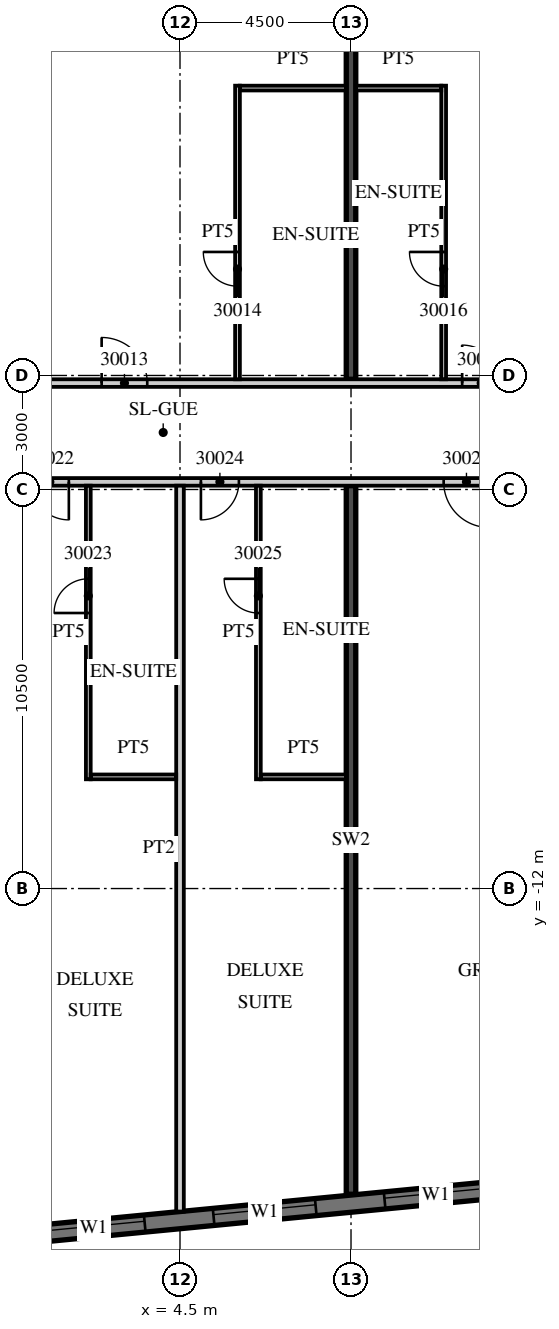
"""IFC4 building model, lengths in metres.
Left out: names, types, materials, properties, quantities, classifications, styles, units other than length and angle.
Written with IfcOpenShell. Run it as: python <this file> out.ifc"""

import sys

from ifc_helpers import new_model, si_unit, direction, frame, frame_2d, origin, place, context, subcontext, project, spatial, rectangle, extrude, element, fill, save


model = new_model("IFC4")
c1 = context("Model", 3, precision=1e-05, world=origin(), true_north=direction((0.0, 1.0)))
c2 = subcontext(c1, "Body", "Model", "MODEL_VIEW")
j1 = project(units=[si_unit("LENGTHUNIT", "METRE"), si_unit("PLANEANGLEUNIT", "RADIAN")], contexts=[c1])
p1 = place(None, origin())
s1 = spatial("IfcSite", under=j1, at=p1, CompositionType="ELEMENT")
p2 = place(p1, origin())
s2 = spatial("IfcBuilding", under=s1, at=p2, CompositionType="ELEMENT")
p3 = place(p2, frame((0.0, 0.0, 133.9)))
s3 = spatial("IfcBuildingStorey", under=s2, at=p3, CompositionType="ELEMENT", Elevation=133.9)
p4 = place(p3, frame((9.0, -20.044, 0.0), z_axis=(0.0, 0.0, 1.0), x_axis=(0.0, 1.0, 0.0)))
e1 = element("IfcWall", 1, at=p4, inside=s3, PredefinedType="SHEAR", context=c2, shape_type="SweptSolid", body=[
    extrude(rectangle(XDim=18.644, YDim=0.25, at=frame_2d((9.322, 0.0))), origin(), (0.0, 0.0, 1.0), 3.3),
])
p5 = place(p3, frame((9.0, 1.4, 0.0), z_axis=(0.0, 0.0, 1.0), x_axis=(0.0, 1.0, 0.0)))
e2 = element("IfcWall", 2, at=p5, inside=s3, PredefinedType="SHEAR", context=c2, shape_type="SweptSolid", body=[
    extrude(rectangle(XDim=20.807, YDim=0.25, at=frame_2d((10.403, 0.0))), origin(), (0.0, 0.0, 1.0), 3.3),
])
p6 = place(p3, frame((-13.521, -22.46, 0.0), z_axis=(0.0, 0.0, 1.0), x_axis=(0.995396096335, 0.095846812164, 0.0)))
e3 = element("IfcWall", 3, at=p6, inside=s3, PredefinedType="SOLIDWALL", context=c2, shape_type="SweptSolid", body=[
    extrude(rectangle(XDim=59.151, YDim=0.45, at=frame_2d((29.575, 0.0))), origin(), (0.0, 0.0, 1.0), 3.02),
])
p7 = place(p6, frame((0.91, 0.0, 0.45)))
e4 = element("IfcOpeningElement", 4, at=p7, cuts=e3, PredefinedType="OPENING", context=c2, shape_type="SweptSolid", body=[
    extrude(rectangle(XDim=2.7, YDim=2.25, at=frame_2d((1.35, 1.125))), frame((0.0, 0.235, 0.0), z_axis=(0.0, -1.0, 0.0), x_axis=(1.0, 0.0, 0.0)), (0.0, 0.0, 1.0), 0.47),
])
p8 = place(p6, frame((5.431, 0.0, 0.45)))
e5 = element("IfcOpeningElement", 5, at=p8, cuts=e3, PredefinedType="OPENING", context=c2, shape_type="SweptSolid", body=[
    extrude(rectangle(XDim=2.7, YDim=2.25, at=frame_2d((1.35, 1.125))), frame((0.0, 0.235, 0.0), z_axis=(0.0, -1.0, 0.0), x_axis=(1.0, 0.0, 0.0)), (0.0, 0.0, 1.0), 0.47),
])
p9 = place(p6, frame((9.952, 0.0, 0.45)))
e6 = element("IfcOpeningElement", 6, at=p9, cuts=e3, PredefinedType="OPENING", context=c2, shape_type="SweptSolid", body=[
    extrude(rectangle(XDim=2.7, YDim=2.25, at=frame_2d((1.35, 1.125))), frame((0.0, 0.235, 0.0), z_axis=(0.0, -1.0, 0.0), x_axis=(1.0, 0.0, 0.0)), (0.0, 0.0, 1.0), 0.47),
])
p10 = place(p6, frame((14.473, 0.0, 0.45)))
e7 = element("IfcOpeningElement", 7, at=p10, cuts=e3, PredefinedType="OPENING", context=c2, shape_type="SweptSolid", body=[
    extrude(rectangle(XDim=2.7, YDim=2.25, at=frame_2d((1.35, 1.125))), frame((0.0, 0.235, 0.0), z_axis=(0.0, -1.0, 0.0), x_axis=(1.0, 0.0, 0.0)), (0.0, 0.0, 1.0), 0.47),
])
p11 = place(p6, frame((18.994, 0.0, 0.45)))
e8 = element("IfcOpeningElement", 8, at=p11, cuts=e3, PredefinedType="OPENING", context=c2, shape_type="SweptSolid", body=[
    extrude(rectangle(XDim=2.7, YDim=2.25, at=frame_2d((1.35, 1.125))), frame((0.0, 0.235, 0.0), z_axis=(0.0, -1.0, 0.0), x_axis=(1.0, 0.0, 0.0)), (0.0, 0.0, 1.0), 0.47),
])
p12 = place(p6, frame((23.514, 0.0, 0.45)))
e9 = element("IfcOpeningElement", 9, at=p12, cuts=e3, PredefinedType="OPENING", context=c2, shape_type="SweptSolid", body=[
    extrude(rectangle(XDim=2.7, YDim=2.25, at=frame_2d((1.35, 1.125))), frame((0.0, 0.235, 0.0), z_axis=(0.0, -1.0, 0.0), x_axis=(1.0, 0.0, 0.0)), (0.0, 0.0, 1.0), 0.47),
])
p13 = place(p6, frame((28.035, 0.0, 0.45)))
e10 = element("IfcOpeningElement", 10, at=p13, cuts=e3, PredefinedType="OPENING", context=c2, shape_type="SweptSolid", body=[
    extrude(rectangle(XDim=2.7, YDim=2.25, at=frame_2d((1.35, 1.125))), frame((0.0, 0.235, 0.0), z_axis=(0.0, -1.0, 0.0), x_axis=(1.0, 0.0, 0.0)), (0.0, 0.0, 1.0), 0.47),
])
p14 = place(p6, frame((32.556, 0.0, 0.45)))
e11 = element("IfcOpeningElement", 11, at=p14, cuts=e3, PredefinedType="OPENING", context=c2, shape_type="SweptSolid", body=[
    extrude(rectangle(XDim=2.7, YDim=2.25, at=frame_2d((1.35, 1.125))), frame((0.0, 0.235, 0.0), z_axis=(0.0, -1.0, 0.0), x_axis=(1.0, 0.0, 0.0)), (0.0, 0.0, 1.0), 0.47),
])
p15 = place(p6, frame((37.077, 0.0, 0.45)))
e12 = element("IfcOpeningElement", 12, at=p15, cuts=e3, PredefinedType="OPENING", context=c2, shape_type="SweptSolid", body=[
    extrude(rectangle(XDim=2.7, YDim=2.25, at=frame_2d((1.35, 1.125))), frame((0.0, 0.235, 0.0), z_axis=(0.0, -1.0, 0.0), x_axis=(1.0, 0.0, 0.0)), (0.0, 0.0, 1.0), 0.47),
])
p16 = place(p6, frame((41.598, 0.0, 0.45)))
e13 = element("IfcOpeningElement", 13, at=p16, cuts=e3, PredefinedType="OPENING", context=c2, shape_type="SweptSolid", body=[
    extrude(rectangle(XDim=2.7, YDim=2.25, at=frame_2d((1.35, 1.125))), frame((0.0, 0.235, 0.0), z_axis=(0.0, -1.0, 0.0), x_axis=(1.0, 0.0, 0.0)), (0.0, 0.0, 1.0), 0.47),
])
p17 = place(p6, frame((46.118, 0.0, 0.45)))
e14 = element("IfcOpeningElement", 14, at=p17, cuts=e3, PredefinedType="OPENING", context=c2, shape_type="SweptSolid", body=[
    extrude(rectangle(XDim=2.7, YDim=2.25, at=frame_2d((1.35, 1.125))), frame((0.0, 0.235, 0.0), z_axis=(0.0, -1.0, 0.0), x_axis=(1.0, 0.0, 0.0)), (0.0, 0.0, 1.0), 0.47),
])
p18 = place(p6, frame((50.639, 0.0, 0.45)))
e15 = element("IfcOpeningElement", 15, at=p18, cuts=e3, PredefinedType="OPENING", context=c2, shape_type="SweptSolid", body=[
    extrude(rectangle(XDim=2.7, YDim=2.25, at=frame_2d((1.35, 1.125))), frame((0.0, 0.235, 0.0), z_axis=(0.0, -1.0, 0.0), x_axis=(1.0, 0.0, 0.0)), (0.0, 0.0, 1.0), 0.47),
])
p19 = place(p6, frame((55.15, 0.0, 0.45)))
e16 = element("IfcOpeningElement", 16, at=p19, cuts=e3, PredefinedType="OPENING", context=c2, shape_type="SweptSolid", body=[
    extrude(rectangle(XDim=2.7, YDim=2.25, at=frame_2d((1.35, 1.125))), frame((0.0, 0.235, 0.0), z_axis=(0.0, -1.0, 0.0), x_axis=(1.0, 0.0, 0.0)), (0.0, 0.0, 1.0), 0.47),
])
p20 = place(p3, frame((-39.316, 1.3, 0.0), z_axis=(0.0, 0.0, 1.0), x_axis=(1.0, 0.0, 0.0)))
e17 = element("IfcWall", 17, at=p20, inside=s3, PredefinedType="PARTITIONING", context=c2, shape_type="SweptSolid", body=[
    extrude(rectangle(XDim=52.816, YDim=0.2, at=frame_2d((26.408, 0.0))), origin(), (0.0, 0.0, 1.0), 3.02),
])
p21 = place(p20, frame((0.15, 0.0, 0.0)))
e18 = element("IfcOpeningElement", 18, at=p21, cuts=e17, PredefinedType="OPENING", context=c2, shape_type="SweptSolid", body=[
    extrude(rectangle(XDim=0.9, YDim=2.1, at=frame_2d((0.45, 1.05))), frame((0.0, 0.11, 0.0), z_axis=(0.0, -1.0, 0.0), x_axis=(1.0, 0.0, 0.0)), (0.0, 0.0, 1.0), 0.22),
])
p22 = place(p20, frame((8.679, 0.0, 0.0)))
e19 = element("IfcOpeningElement", 19, at=p22, cuts=e17, PredefinedType="OPENING", context=c2, shape_type="SweptSolid", body=[
    extrude(rectangle(XDim=1.2, YDim=2.1, at=frame_2d((0.6, 1.05))), frame((0.0, 0.11, 0.0), z_axis=(0.0, -1.0, 0.0), x_axis=(1.0, 0.0, 0.0)), (0.0, 0.0, 1.0), 0.22),
])
p23 = place(p20, frame((14.754, 0.0, 0.0)))
e20 = element("IfcOpeningElement", 20, at=p23, cuts=e17, PredefinedType="OPENING", context=c2, shape_type="SweptSolid", body=[
    extrude(rectangle(XDim=1.2, YDim=2.1, at=frame_2d((0.6, 1.05))), frame((0.0, 0.11, 0.0), z_axis=(0.0, -1.0, 0.0), x_axis=(1.0, 0.0, 0.0)), (0.0, 0.0, 1.0), 0.22),
])
p24 = place(p20, frame((26.678, 0.0, 0.0)))
e21 = element("IfcOpeningElement", 21, at=p24, cuts=e17, PredefinedType="OPENING", context=c2, shape_type="SweptSolid", body=[
    extrude(rectangle(XDim=1.2, YDim=2.1, at=frame_2d((0.6, 1.05))), frame((0.0, 0.11, 0.0), z_axis=(0.0, -1.0, 0.0), x_axis=(1.0, 0.0, 0.0)), (0.0, 0.0, 1.0), 0.22),
])
p25 = place(p20, frame((33.266, 0.0, 0.0)))
e22 = element("IfcOpeningElement", 22, at=p25, cuts=e17, PredefinedType="OPENING", context=c2, shape_type="SweptSolid", body=[
    extrude(rectangle(XDim=1.0, YDim=2.1, at=frame_2d((0.5, 1.05))), frame((0.0, 0.11, 0.0), z_axis=(0.0, -1.0, 0.0), x_axis=(1.0, 0.0, 0.0)), (0.0, 0.0, 1.0), 0.22),
])
p26 = place(p20, frame((37.741, 0.0, 0.0)))
e23 = element("IfcOpeningElement", 23, at=p26, cuts=e17, PredefinedType="OPENING", context=c2, shape_type="SweptSolid", body=[
    extrude(rectangle(XDim=1.0, YDim=2.1, at=frame_2d((0.5, 1.05))), frame((0.0, 0.11, 0.0), z_axis=(0.0, -1.0, 0.0), x_axis=(1.0, 0.0, 0.0)), (0.0, 0.0, 1.0), 0.22),
])
p27 = place(p20, frame((41.754, 0.0, 0.0)))
e24 = element("IfcOpeningElement", 24, at=p27, cuts=e17, PredefinedType="OPENING", context=c2, shape_type="SweptSolid", body=[
    extrude(rectangle(XDim=1.2, YDim=2.1, at=frame_2d((0.6, 1.05))), frame((0.0, 0.11, 0.0), z_axis=(0.0, -1.0, 0.0), x_axis=(1.0, 0.0, 0.0)), (0.0, 0.0, 1.0), 0.22),
])
p28 = place(p20, frame((51.241, 0.0, 0.0)))
e25 = element("IfcOpeningElement", 25, at=p28, cuts=e17, PredefinedType="OPENING", context=c2, shape_type="SweptSolid", body=[
    extrude(rectangle(XDim=1.0, YDim=2.1, at=frame_2d((0.5, 1.05))), frame((0.0, 0.11, 0.0), z_axis=(0.0, -1.0, 0.0), x_axis=(1.0, 0.0, 0.0)), (0.0, 0.0, 1.0), 0.22),
])
p29 = place(p3, frame((6.013, 1.4, 0.0), z_axis=(0.0, 0.0, 1.0), x_axis=(0.0, 1.0, 0.0)))
e26 = element("IfcWall", 26, at=p29, inside=s3, PredefinedType="PARTITIONING", context=c2, shape_type="SweptSolid", body=[
    extrude(rectangle(XDim=7.725, YDim=0.125, at=frame_2d((3.863, 0.0))), origin(), (0.0, 0.0, 1.0), 3.02),
])
p30 = place(p29, frame((2.45, 0.0, 0.0)))
e27 = element("IfcOpeningElement", 27, at=p30, cuts=e26, PredefinedType="OPENING", context=c2, shape_type="SweptSolid", body=[
    extrude(rectangle(XDim=0.9, YDim=2.1, at=frame_2d((0.45, 1.05))), frame((0.0, 0.073, 0.0), z_axis=(0.0, -1.0, 0.0), x_axis=(1.0, 0.0, 0.0)), (0.0, 0.0, 1.0), 0.145),
])
p31 = place(p3, frame((6.075, 9.062, 0.0), z_axis=(0.0, 0.0, 1.0), x_axis=(1.0, 0.0, 0.0)))
e28 = element("IfcWall", 28, at=p31, inside=s3, PredefinedType="PARTITIONING", context=c2, shape_type="SweptSolid", body=[
    extrude(rectangle(XDim=2.8, YDim=0.125, at=frame_2d((1.4, 0.0))), origin(), (0.0, 0.0, 1.0), 3.02),
])
p32 = place(p3, frame((11.438, 1.4, 0.0), z_axis=(0.0, 0.0, 1.0), x_axis=(0.0, 1.0, 0.0)))
e29 = element("IfcWall", 29, at=p32, inside=s3, PredefinedType="PARTITIONING", context=c2, shape_type="SweptSolid", body=[
    extrude(rectangle(XDim=7.725, YDim=0.125, at=frame_2d((3.863, 0.0))), origin(), (0.0, 0.0, 1.0), 3.02),
])
p33 = place(p32, frame((2.45, 0.0, 0.0)))
e30 = element("IfcOpeningElement", 30, at=p33, cuts=e29, PredefinedType="OPENING", context=c2, shape_type="SweptSolid", body=[
    extrude(rectangle(XDim=0.9, YDim=2.1, at=frame_2d((0.45, 1.05))), frame((0.0, 0.073, 0.0), z_axis=(0.0, -1.0, 0.0), x_axis=(1.0, 0.0, 0.0)), (0.0, 0.0, 1.0), 0.145),
])
p34 = place(p3, frame((9.125, 9.062, 0.0), z_axis=(0.0, 0.0, 1.0), x_axis=(1.0, 0.0, 0.0)))
e31 = element("IfcWall", 31, at=p34, inside=s3, PredefinedType="PARTITIONING", context=c2, shape_type="SweptSolid", body=[
    extrude(rectangle(XDim=2.25, YDim=0.125, at=frame_2d((1.125, 0.0))), origin(), (0.0, 0.0, 1.0), 3.02),
])
p35 = place(p3, frame((-13.5, -1.3, 0.0), z_axis=(0.0, 0.0, 1.0), x_axis=(1.0, 0.0, 0.0)))
e32 = element("IfcWall", 32, at=p35, inside=s3, PredefinedType="PARTITIONING", context=c2, shape_type="SweptSolid", body=[
    extrude(rectangle(XDim=60.932, YDim=0.2, at=frame_2d((30.466, 0.0))), origin(), (0.0, 0.0, 1.0), 3.02),
])
p36 = place(p35, frame((2.925, 0.0, 0.0)))
e33 = element("IfcOpeningElement", 33, at=p36, cuts=e32, PredefinedType="OPENING", context=c2, shape_type="SweptSolid", body=[
    extrude(rectangle(XDim=1.0, YDim=2.1, at=frame_2d((0.5, 1.05))), frame((0.0, 0.11, 0.0), z_axis=(0.0, -1.0, 0.0), x_axis=(1.0, 0.0, 0.0)), (0.0, 0.0, 1.0), 0.22),
])
p37 = place(p35, frame((9.863, 0.0, 0.0)))
e34 = element("IfcOpeningElement", 34, at=p37, cuts=e32, PredefinedType="OPENING", context=c2, shape_type="SweptSolid", body=[
    extrude(rectangle(XDim=1.2, YDim=2.1, at=frame_2d((0.6, 1.05))), frame((0.0, 0.11, 0.0), z_axis=(0.0, -1.0, 0.0), x_axis=(1.0, 0.0, 0.0)), (0.0, 0.0, 1.0), 0.22),
])
p38 = place(p35, frame((14.075, 0.0, 0.0)))
e35 = element("IfcOpeningElement", 35, at=p38, cuts=e32, PredefinedType="OPENING", context=c2, shape_type="SweptSolid", body=[
    extrude(rectangle(XDim=1.0, YDim=2.1, at=frame_2d((0.5, 1.05))), frame((0.0, 0.11, 0.0), z_axis=(0.0, -1.0, 0.0), x_axis=(1.0, 0.0, 0.0)), (0.0, 0.0, 1.0), 0.22),
])
p39 = place(p35, frame((18.55, 0.0, 0.0)))
e36 = element("IfcOpeningElement", 36, at=p39, cuts=e32, PredefinedType="OPENING", context=c2, shape_type="SweptSolid", body=[
    extrude(rectangle(XDim=1.0, YDim=2.1, at=frame_2d((0.5, 1.05))), frame((0.0, 0.11, 0.0), z_axis=(0.0, -1.0, 0.0), x_axis=(1.0, 0.0, 0.0)), (0.0, 0.0, 1.0), 0.22),
])
p40 = place(p35, frame((24.938, 0.0, 0.0)))
e37 = element("IfcOpeningElement", 37, at=p40, cuts=e32, PredefinedType="OPENING", context=c2, shape_type="SweptSolid", body=[
    extrude(rectangle(XDim=1.2, YDim=2.1, at=frame_2d((0.6, 1.05))), frame((0.0, 0.11, 0.0), z_axis=(0.0, -1.0, 0.0), x_axis=(1.0, 0.0, 0.0)), (0.0, 0.0, 1.0), 0.22),
])
p41 = place(p35, frame((36.862, 0.0, 0.0)))
e38 = element("IfcOpeningElement", 38, at=p41, cuts=e32, PredefinedType="OPENING", context=c2, shape_type="SweptSolid", body=[
    extrude(rectangle(XDim=1.2, YDim=2.1, at=frame_2d((0.6, 1.05))), frame((0.0, 0.11, 0.0), z_axis=(0.0, -1.0, 0.0), x_axis=(1.0, 0.0, 0.0)), (0.0, 0.0, 1.0), 0.22),
])
p42 = place(p35, frame((41.075, 0.0, 0.0)))
e39 = element("IfcOpeningElement", 39, at=p42, cuts=e32, PredefinedType="OPENING", context=c2, shape_type="SweptSolid", body=[
    extrude(rectangle(XDim=1.0, YDim=2.1, at=frame_2d((0.5, 1.05))), frame((0.0, 0.11, 0.0), z_axis=(0.0, -1.0, 0.0), x_axis=(1.0, 0.0, 0.0)), (0.0, 0.0, 1.0), 0.22),
])
p43 = place(p35, frame((45.55, 0.0, 0.0)))
e40 = element("IfcOpeningElement", 40, at=p43, cuts=e32, PredefinedType="OPENING", context=c2, shape_type="SweptSolid", body=[
    extrude(rectangle(XDim=1.0, YDim=2.1, at=frame_2d((0.5, 1.05))), frame((0.0, 0.11, 0.0), z_axis=(0.0, -1.0, 0.0), x_axis=(1.0, 0.0, 0.0)), (0.0, 0.0, 1.0), 0.22),
])
p44 = place(p35, frame((52.425, 0.0, 0.0)))
e41 = element("IfcOpeningElement", 41, at=p44, cuts=e32, PredefinedType="OPENING", context=c2, shape_type="SweptSolid", body=[
    extrude(rectangle(XDim=1.0, YDim=2.1, at=frame_2d((0.5, 1.05))), frame((0.0, 0.11, 0.0), z_axis=(0.0, -1.0, 0.0), x_axis=(1.0, 0.0, 0.0)), (0.0, 0.0, 1.0), 0.22),
])
p45 = place(p35, frame((56.95, 0.0, 0.0)))
e42 = element("IfcOpeningElement", 42, at=p45, cuts=e32, PredefinedType="OPENING", context=c2, shape_type="SweptSolid", body=[
    extrude(rectangle(XDim=1.0, YDim=2.1, at=frame_2d((0.5, 1.05))), frame((0.0, 0.11, 0.0), z_axis=(0.0, -1.0, 0.0), x_axis=(1.0, 0.0, 0.0)), (0.0, 0.0, 1.0), 0.22),
])
p46 = place(p35, frame((59.882, 0.0, 0.0)))
e43 = element("IfcOpeningElement", 43, at=p46, cuts=e32, PredefinedType="OPENING", context=c2, shape_type="SweptSolid", body=[
    extrude(rectangle(XDim=0.9, YDim=2.1, at=frame_2d((0.45, 1.05))), frame((0.0, 0.11, 0.0), z_axis=(0.0, -1.0, 0.0), x_axis=(1.0, 0.0, 0.0)), (0.0, 0.0, 1.0), 0.22),
])
p47 = place(p3, frame((4.5, -20.499, 0.0), z_axis=(0.0, 0.0, 1.0), x_axis=(0.0, 1.0, 0.0)))
e44 = element("IfcWall", 44, at=p47, inside=s3, PredefinedType="PARTITIONING", context=c2, shape_type="SweptSolid", body=[
    extrude(rectangle(XDim=19.099, YDim=0.2, at=frame_2d((9.55, 0.0))), origin(), (0.0, 0.0, 1.0), 3.02),
])
p48 = place(p3, frame((2.087, -9.125, 0.0), z_axis=(0.0, 0.0, 1.0), x_axis=(0.0, 1.0, 0.0)))
e45 = element("IfcWall", 45, at=p48, inside=s3, PredefinedType="PARTITIONING", context=c2, shape_type="SweptSolid", body=[
    extrude(rectangle(XDim=7.725, YDim=0.125, at=frame_2d((3.863, 0.0))), origin(), (0.0, 0.0, 1.0), 3.02),
])
p49 = place(p48, frame((4.375, 0.0, 0.0)))
e46 = element("IfcOpeningElement", 46, at=p49, cuts=e45, PredefinedType="OPENING", context=c2, shape_type="SweptSolid", body=[
    extrude(rectangle(XDim=0.9, YDim=2.1, at=frame_2d((0.45, 1.05))), frame((0.0, 0.073, 0.0), z_axis=(0.0, -1.0, 0.0), x_axis=(1.0, 0.0, 0.0)), (0.0, 0.0, 1.0), 0.145),
])
p50 = place(p3, frame((2.15, -9.062, 0.0), z_axis=(0.0, 0.0, 1.0), x_axis=(1.0, 0.0, 0.0)))
e47 = element("IfcWall", 47, at=p50, inside=s3, PredefinedType="PARTITIONING", context=c2, shape_type="SweptSolid", body=[
    extrude(rectangle(XDim=2.25, YDim=0.125, at=frame_2d((1.125, 0.0))), origin(), (0.0, 0.0, 1.0), 3.02),
])
p51 = place(p3, frame((6.562, -9.125, 0.0), z_axis=(0.0, 0.0, 1.0), x_axis=(0.0, 1.0, 0.0)))
e48 = element("IfcWall", 48, at=p51, inside=s3, PredefinedType="PARTITIONING", context=c2, shape_type="SweptSolid", body=[
    extrude(rectangle(XDim=7.725, YDim=0.125, at=frame_2d((3.863, 0.0))), origin(), (0.0, 0.0, 1.0), 3.02),
])
p52 = place(p51, frame((4.375, 0.0, 0.0)))
e49 = element("IfcOpeningElement", 49, at=p52, cuts=e48, PredefinedType="OPENING", context=c2, shape_type="SweptSolid", body=[
    extrude(rectangle(XDim=0.9, YDim=2.1, at=frame_2d((0.45, 1.05))), frame((0.0, 0.073, 0.0), z_axis=(0.0, -1.0, 0.0), x_axis=(1.0, 0.0, 0.0)), (0.0, 0.0, 1.0), 0.145),
])
p53 = place(p3, frame((6.625, -9.062, 0.0), z_axis=(0.0, 0.0, 1.0), x_axis=(1.0, 0.0, 0.0)))
e50 = element("IfcWall", 50, at=p53, inside=s3, PredefinedType="PARTITIONING", context=c2, shape_type="SweptSolid", body=[
    extrude(rectangle(XDim=2.25, YDim=0.125, at=frame_2d((1.125, 0.0))), origin(), (0.0, 0.0, 1.0), 3.02),
])
p54 = place(p10, origin())
e51 = element("IfcWindow", 51, at=p54, inside=s3, PartitioningType="SINGLE_PANEL", PredefinedType="WINDOW", context=c2, shape_type="SweptSolid", body=[
    extrude(rectangle(XDim=2.7, YDim=2.25, at=frame_2d((1.35, 1.125))), frame((0.0, 0.09, 0.0), z_axis=(0.0, -1.0, 0.0), x_axis=(1.0, 0.0, 0.0)), (0.0, 0.0, 1.0), 0.06),
])
fill(e7, e51)
p55 = place(p11, origin())
e52 = element("IfcWindow", 52, at=p55, inside=s3, PartitioningType="SINGLE_PANEL", PredefinedType="WINDOW", context=c2, shape_type="SweptSolid", body=[
    extrude(rectangle(XDim=2.7, YDim=2.25, at=frame_2d((1.35, 1.125))), frame((0.0, 0.09, 0.0), z_axis=(0.0, -1.0, 0.0), x_axis=(1.0, 0.0, 0.0)), (0.0, 0.0, 1.0), 0.06),
])
fill(e8, e52)
p56 = place(p12, origin())
e53 = element("IfcWindow", 53, at=p56, inside=s3, PartitioningType="SINGLE_PANEL", PredefinedType="WINDOW", context=c2, shape_type="SweptSolid", body=[
    extrude(rectangle(XDim=2.7, YDim=2.25, at=frame_2d((1.35, 1.125))), frame((0.0, 0.09, 0.0), z_axis=(0.0, -1.0, 0.0), x_axis=(1.0, 0.0, 0.0)), (0.0, 0.0, 1.0), 0.06),
])
fill(e9, e53)
p57 = place(p27, origin())
e54 = element("IfcDoor", 54, at=p57, inside=s3, OperationType="SINGLE_SWING_LEFT", PredefinedType="DOOR", context=c2, shape_type="SweptSolid", body=[
    extrude(rectangle(XDim=1.2, YDim=2.1, at=frame_2d((0.6, 1.05))), frame((0.0, 0.025, 0.0), z_axis=(0.0, -1.0, 0.0), x_axis=(1.0, 0.0, 0.0)), (0.0, 0.0, 1.0), 0.05),
])
fill(e24, e54)
p58 = place(p30, origin())
e55 = element("IfcDoor", 55, at=p58, inside=s3, OperationType="SINGLE_SWING_RIGHT", PredefinedType="DOOR", context=c2, shape_type="SweptSolid", body=[
    extrude(rectangle(XDim=0.9, YDim=2.1, at=frame_2d((0.45, 1.05))), frame((0.0, 0.025, 0.0), z_axis=(0.0, -1.0, 0.0), x_axis=(1.0, 0.0, 0.0)), (0.0, 0.0, 1.0), 0.05),
])
fill(e27, e55)
p59 = place(p28, origin())
e56 = element("IfcDoor", 56, at=p59, inside=s3, OperationType="SINGLE_SWING_LEFT", PredefinedType="DOOR", context=c2, shape_type="SweptSolid", body=[
    extrude(rectangle(XDim=1.0, YDim=2.1, at=frame_2d((0.5, 1.05))), frame((0.0, 0.025, 0.0), z_axis=(0.0, -1.0, 0.0), x_axis=(1.0, 0.0, 0.0)), (0.0, 0.0, 1.0), 0.05),
])
fill(e25, e56)
p60 = place(p33, origin())
e57 = element("IfcDoor", 57, at=p60, inside=s3, OperationType="SINGLE_SWING_RIGHT", PredefinedType="DOOR", context=c2, shape_type="SweptSolid", body=[
    extrude(rectangle(XDim=0.9, YDim=2.1, at=frame_2d((0.45, 1.05))), frame((0.0, 0.025, 0.0), z_axis=(0.0, -1.0, 0.0), x_axis=(1.0, 0.0, 0.0)), (0.0, 0.0, 1.0), 0.05),
])
fill(e30, e57)
p61 = place(p38, origin())
e58 = element("IfcDoor", 58, at=p61, inside=s3, OperationType="SINGLE_SWING_RIGHT", PredefinedType="DOOR", context=c2, shape_type="SweptSolid", body=[
    extrude(rectangle(XDim=1.0, YDim=2.1, at=frame_2d((0.5, 1.05))), frame((0.0, 0.025, 0.0), z_axis=(0.0, -1.0, 0.0), x_axis=(1.0, 0.0, 0.0)), (0.0, 0.0, 1.0), 0.05),
])
fill(e35, e58)
p62 = place(p49, origin())
e59 = element("IfcDoor", 59, at=p62, inside=s3, OperationType="SINGLE_SWING_LEFT", PredefinedType="DOOR", context=c2, shape_type="SweptSolid", body=[
    extrude(rectangle(XDim=0.9, YDim=2.1, at=frame_2d((0.45, 1.05))), frame((0.0, 0.025, 0.0), z_axis=(0.0, -1.0, 0.0), x_axis=(1.0, 0.0, 0.0)), (0.0, 0.0, 1.0), 0.05),
])
fill(e46, e59)
p63 = place(p39, origin())
e60 = element("IfcDoor", 60, at=p63, inside=s3, OperationType="SINGLE_SWING_LEFT", PredefinedType="DOOR", context=c2, shape_type="SweptSolid", body=[
    extrude(rectangle(XDim=1.0, YDim=2.1, at=frame_2d((0.5, 1.05))), frame((0.0, 0.025, 0.0), z_axis=(0.0, -1.0, 0.0), x_axis=(1.0, 0.0, 0.0)), (0.0, 0.0, 1.0), 0.05),
])
fill(e36, e60)
p64 = place(p52, origin())
e61 = element("IfcDoor", 61, at=p64, inside=s3, OperationType="SINGLE_SWING_RIGHT", PredefinedType="DOOR", context=c2, shape_type="SweptSolid", body=[
    extrude(rectangle(XDim=0.9, YDim=2.1, at=frame_2d((0.45, 1.05))), frame((0.0, 0.025, 0.0), z_axis=(0.0, -1.0, 0.0), x_axis=(1.0, 0.0, 0.0)), (0.0, 0.0, 1.0), 0.05),
])
fill(e49, e61)
p65 = place(p40, origin())
e62 = element("IfcDoor", 62, at=p65, inside=s3, OperationType="SINGLE_SWING_RIGHT", PredefinedType="DOOR", context=c2, shape_type="SweptSolid", body=[
    extrude(rectangle(XDim=1.2, YDim=2.1, at=frame_2d((0.6, 1.05))), frame((0.0, 0.025, 0.0), z_axis=(0.0, -1.0, 0.0), x_axis=(1.0, 0.0, 0.0)), (0.0, 0.0, 1.0), 0.05),
])
fill(e37, e62)
save(model, sys.argv[1])
